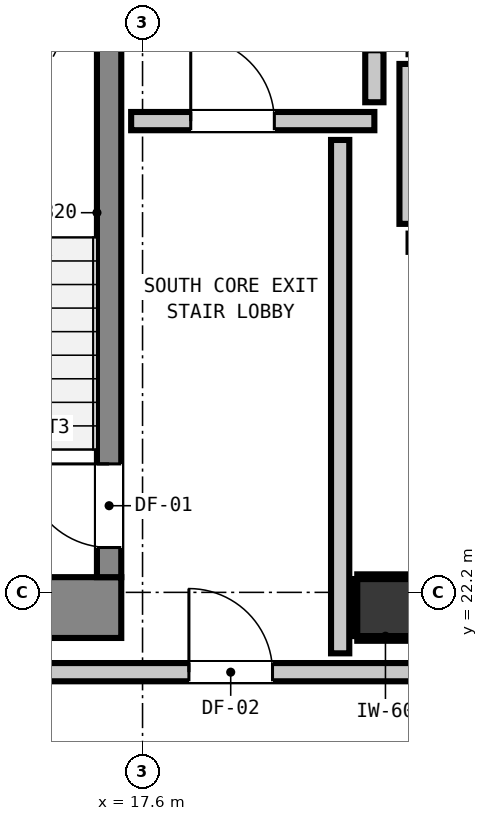
"""IFC4 building model, lengths in metres.
Left out: names, types, materials, properties, quantities, classifications, styles, units other than length and angle.
Written with IfcOpenShell. Run it as: python <this file> out.ifc"""

import sys

from ifc_helpers import new_model, si_unit, direction, frame, frame_2d, origin, origin_2d, place, context, subcontext, project, spatial, rectangle, extrude, element, fill, save


model = new_model("IFC4")
c1 = context("Model", 3, precision=1e-05, world=origin(), true_north=direction((0.0, 1.0)))
c2 = subcontext(c1, "Body", "Model", "MODEL_VIEW")
j1 = project(units=[si_unit("LENGTHUNIT", "METRE"), si_unit("PLANEANGLEUNIT", "RADIAN")], contexts=[c1])
p1 = place(None, origin())
s1 = spatial("IfcSite", under=j1, at=p1, CompositionType="ELEMENT")
p2 = place(p1, origin())
s2 = spatial("IfcBuilding", under=s1, at=p2, CompositionType="ELEMENT")
p3 = place(p2, frame((0.0, 0.0, 190.16)))
s3 = spatial("IfcBuildingStorey", under=s2, at=p3, CompositionType="ELEMENT", Elevation=190.16)
p4 = place(p3, frame((20.8, 22.0, 0.0), z_axis=(0.0, 0.0, 1.0), x_axis=(1.0, 0.0, 0.0)))
e1 = element("IfcColumn", 1, at=p4, inside=s3, PredefinedType="COLUMN", context=c2, shape_type="SweptSolid", body=[
    extrude(rectangle(XDim=0.75, YDim=0.75, at=origin_2d()), origin(), (0.0, 0.0, 1.0), 3.32),
])
p5 = place(p3, frame((13.24, 22.0, 0.0), z_axis=(0.0, 0.0, 1.0), x_axis=(1.0, 0.0, 0.0)))
e2 = element("IfcWall", 2, at=p5, inside=s3, PredefinedType="SHEAR", context=c2, shape_type="SweptSolid", body=[
    extrude(rectangle(XDim=4.08, YDim=0.8, at=frame_2d((2.04, 0.0))), origin(), (0.0, 0.0, 1.0), 3.32),
])
p6 = place(p3, frame((17.16, 22.4, 0.0), z_axis=(0.0, 0.0, 1.0), x_axis=(0.0, 1.0, 0.0)))
e3 = element("IfcWall", 3, at=p6, inside=s3, PredefinedType="SHEAR", context=c2, shape_type="SweptSolid", body=[
    extrude(rectangle(XDim=8.0, YDim=0.32, at=frame_2d((4.0, 0.0))), origin(), (0.0, 0.0, 1.0), 3.32),
])
p7 = place(p6, frame((0.39, 0.0, 0.0)))
e4 = element("IfcOpeningElement", 4, at=p7, cuts=e3, PredefinedType="OPENING", context=c2, shape_type="SweptSolid", body=[
    extrude(rectangle(XDim=1.1, YDim=2.15, at=frame_2d((0.55, 1.075))), frame((0.0, 0.17, 0.0), z_axis=(0.0, -1.0, 0.0), x_axis=(1.0, 0.0, 0.0)), (0.0, 0.0, 1.0), 0.34),
])
for number, where, z_axis, x_axis in (
    (5, (21.1, 26.8, 0.0), (0.0, 0.0, 1.0), (1.0, 0.0, 0.0)),
    (6, (21.1, 29.4, 0.0), (0.0, 0.0, 1.0), (1.0, 0.0, 0.0)),
):
    element("IfcWall", number, at=place(p3, frame(where, z_axis=z_axis, x_axis=x_axis)), inside=s3, PredefinedType="PARTITIONING", context=c2, shape_type="SweptSolid", body=[
        extrude(rectangle(XDim=2.2, YDim=0.24, at=frame_2d((1.1, 0.0))), origin(), (0.0, 0.0, 1.0), 3.1),
    ])
p8 = place(p3, frame((21.1, 27.048, 0.0), z_axis=(0.0, 0.0, 1.0), x_axis=(0.0, 1.0, 0.0)))
e7 = element("IfcWall", 7, at=p8, inside=s3, PredefinedType="PARTITIONING", context=c2, shape_type="SweptSolid", body=[
    extrude(rectangle(XDim=2.104, YDim=0.24, at=frame_2d((1.052, 0.0))), origin(), (0.0, 0.0, 1.0), 2.335),
])
p9 = place(p3, frame((4.587, 21.15, 0.0), z_axis=(0.0, 0.0, 1.0), x_axis=(1.0, 0.0, 0.0)))
e8 = element("IfcWall", 8, at=p9, inside=s3, PredefinedType="PARTITIONING", context=c2, shape_type="SweptSolid", body=[
    extrude(rectangle(XDim=36.626, YDim=0.24, at=frame_2d((18.313, 0.0))), origin(), (0.0, 0.0, 1.0), 3.1),
])
p10 = place(p9, frame((13.623, 0.0, 0.0)))
e9 = element("IfcOpeningElement", 9, at=p10, cuts=e8, PredefinedType="OPENING", context=c2, shape_type="SweptSolid", body=[
    extrude(rectangle(XDim=1.1, YDim=2.15, at=frame_2d((0.55, 1.075))), frame((0.0, 0.13, 0.0), z_axis=(0.0, -1.0, 0.0), x_axis=(1.0, 0.0, 0.0)), (0.0, 0.0, 1.0), 0.26),
])
p11 = place(p9, frame((4.723, 0.0, 0.0)))
e10 = element("IfcOpeningElement", 10, at=p11, cuts=e8, PredefinedType="OPENING", context=c2, shape_type="SweptSolid", body=[
    extrude(rectangle(XDim=1.0, YDim=2.15, at=frame_2d((0.5, 1.075))), frame((0.0, 0.13, 0.0), z_axis=(0.0, -1.0, 0.0), x_axis=(1.0, 0.0, 0.0)), (0.0, 0.0, 1.0), 0.26),
])
p12 = place(p3, frame((17.45, 28.4, 0.0), z_axis=(0.0, 0.0, 1.0), x_axis=(1.0, 0.0, 0.0)))
e11 = element("IfcWall", 11, at=p12, inside=s3, PredefinedType="PARTITIONING", context=c2, shape_type="SweptSolid", body=[
    extrude(rectangle(XDim=3.2, YDim=0.24, at=frame_2d((1.6, 0.0))), origin(), (0.0, 0.0, 1.0), 3.1),
])
p13 = place(p12, frame((0.784, 0.0, 0.0)))
e12 = element("IfcOpeningElement", 12, at=p13, cuts=e11, PredefinedType="OPENING", context=c2, shape_type="SweptSolid", body=[
    extrude(rectangle(XDim=1.1, YDim=2.15, at=frame_2d((0.55, 1.075))), frame((0.0, 0.13, 0.0), z_axis=(0.0, -1.0, 0.0), x_axis=(1.0, 0.0, 0.0)), (0.0, 0.0, 1.0), 0.26),
])
p14 = place(p3, frame((20.2, 21.398, 0.0), z_axis=(0.0, 0.0, 1.0), x_axis=(0.0, 1.0, 0.0)))
e13 = element("IfcWall", 13, at=p14, inside=s3, PredefinedType="PARTITIONING", context=c2, shape_type="SweptSolid", body=[
    extrude(rectangle(XDim=6.754, YDim=0.24, at=frame_2d((3.377, 0.0))), origin(), (0.0, 0.0, 1.0), 3.1),
])
p15 = place(p3, frame((20.65, 28.648, 0.0), z_axis=(0.0, 0.0, 1.0), x_axis=(0.0, 1.0, 0.0)))
e14 = element("IfcWall", 14, at=p15, inside=s3, PredefinedType="PARTITIONING", context=c2, shape_type="SweptSolid", body=[
    extrude(rectangle(XDim=0.684, YDim=0.24, at=frame_2d((0.342, 0.0))), origin(), (0.0, 0.0, 1.0), 2.335),
])
for number, where, z_axis, x_axis in (
    (15, (20.425, 21.593, 0.0), (0.0, 0.0, 1.0), (1.0, 0.0, 0.0)),
    (16, (20.425, 22.407, 0.0), (0.0, 0.0, 1.0), (1.0, 0.0, 0.0)),
):
    element("IfcWall", number, at=place(p3, frame(where, z_axis=z_axis, x_axis=x_axis)), inside=s3, PredefinedType="PARTITIONING", context=c2, shape_type="SweptSolid", body=[
        extrude(rectangle(XDim=0.742, YDim=0.06, at=frame_2d((0.371, 0.0))), origin(), (0.0, 0.0, 1.0), 1.45),
    ])
p16 = place(p3, frame((20.393, 21.625, 0.0), z_axis=(0.0, 0.0, 1.0), x_axis=(0.0, 1.0, 0.0)))
e17 = element("IfcWall", 17, at=p16, inside=s3, PredefinedType="PARTITIONING", context=c2, shape_type="SweptSolid", body=[
    extrude(rectangle(XDim=0.75, YDim=0.06, at=frame_2d((0.375, 0.0))), origin(), (0.0, 0.0, 1.0), 1.45),
])
p17 = place(p7, origin())
e18 = element("IfcDoor", 18, at=p17, inside=s3, OperationType="SINGLE_SWING_RIGHT", PredefinedType="DOOR", context=c2, shape_type="SweptSolid", body=[
    extrude(rectangle(XDim=1.1, YDim=2.15, at=frame_2d((0.55, 1.075))), frame((0.0, 0.025, 0.0), z_axis=(0.0, -1.0, 0.0), x_axis=(1.0, 0.0, 0.0)), (0.0, 0.0, 1.0), 0.05),
])
fill(e4, e18)
p18 = place(p13, origin())
e19 = element("IfcDoor", 19, at=p18, inside=s3, OperationType="SINGLE_SWING_LEFT", PredefinedType="DOOR", context=c2, shape_type="SweptSolid", body=[
    extrude(rectangle(XDim=1.1, YDim=2.15, at=frame_2d((0.55, 1.075))), frame((0.0, 0.025, 0.0), z_axis=(0.0, -1.0, 0.0), x_axis=(1.0, 0.0, 0.0)), (0.0, 0.0, 1.0), 0.05),
])
fill(e12, e19)
p19 = place(p10, origin())
e20 = element("IfcDoor", 20, at=p19, inside=s3, OperationType="SINGLE_SWING_LEFT", PredefinedType="DOOR", context=c2, shape_type="SweptSolid", body=[
    extrude(rectangle(XDim=1.1, YDim=2.15, at=frame_2d((0.55, 1.075))), frame((0.0, 0.025, 0.0), z_axis=(0.0, -1.0, 0.0), x_axis=(1.0, 0.0, 0.0)), (0.0, 0.0, 1.0), 0.05),
])
fill(e9, e20)
save(model, sys.argv[1])
